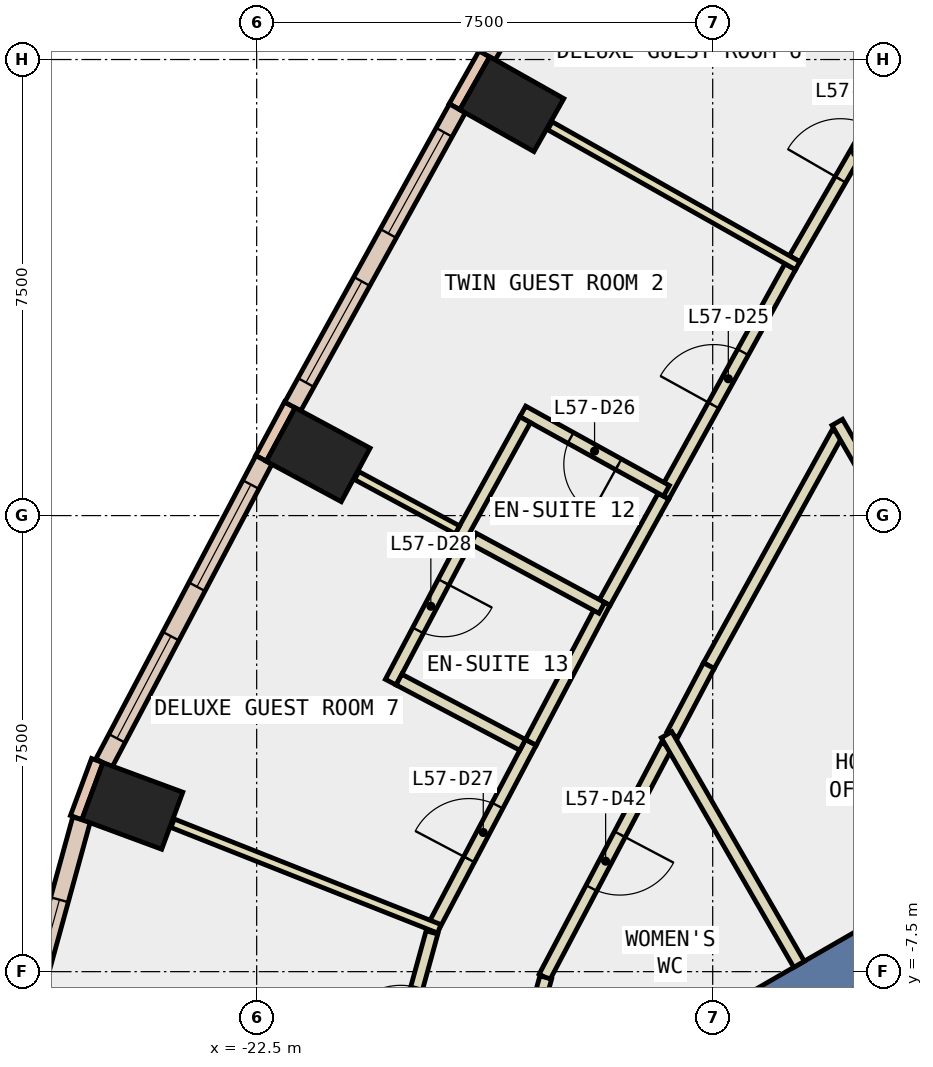
"""IFC4 building model, lengths in metres.
Left out: names, types, materials, properties, quantities, classifications, styles, units other than length and angle.
Written with IfcOpenShell. Run it as: python <this file> out.ifc"""

import sys

from ifc_helpers import new_model, si_unit, direction, frame, frame_2d, origin, origin_2d, place, context, subcontext, project, spatial, rectangle, extrude, element, fill, save


model = new_model("IFC4")
c1 = context("Model", 3, precision=1e-05, world=origin(), true_north=direction((0.0, 1.0)))
c2 = subcontext(c1, "Body", "Model", "MODEL_VIEW")
j1 = project(units=[si_unit("LENGTHUNIT", "METRE"), si_unit("PLANEANGLEUNIT", "RADIAN")], contexts=[c1])
p1 = place(None, origin())
s1 = spatial("IfcSite", under=j1, at=p1, CompositionType="ELEMENT")
p2 = place(p1, origin())
s2 = spatial("IfcBuilding", under=s1, at=p2, CompositionType="ELEMENT")
p3 = place(p2, frame((0.0, 0.0, 252.2)))
s3 = spatial("IfcBuildingStorey", under=s2, at=p3, CompositionType="ELEMENT", Elevation=252.2)
for number, where, z_axis, x_axis in (
    (1, (-18.304, 6.766, -0.34), (0.0, 0.0, 1.0), (0.491, 0.871, 0.0)),
    (2, (-21.488, 1.001, -0.34), (0.0, 0.0, 1.0), (0.474, 0.881, 0.0)),
    (3, (-24.545, -4.775, -0.34), (0.0, 0.0, 1.0), (0.347, 0.938, 0.0)),
):
    element("IfcColumn", number, at=place(p3, frame(where, z_axis=z_axis, x_axis=x_axis)), inside=s3, PredefinedType="COLUMN", context=c2, shape_type="SweptSolid", body=[
        extrude(rectangle(XDim=1.0, YDim=1.4, at=origin_2d()), origin(), (0.0, 0.0, 1.0), 3.6),
    ])
p4 = place(p3, frame((-7.578, -4.375, -0.34), z_axis=(0.0, 0.0, 1.0), x_axis=(-0.866024315419, -0.5000018851, 0.0)))
e4 = element("IfcWall", 4, at=p4, inside=s3, PredefinedType="SHEAR", context=c2, shape_type="SweptSolid", body=[
    extrude(rectangle(XDim=9.0, YDim=0.8, at=frame_2d((4.5, 0.0))), origin(), (0.0, 0.0, 1.0), 3.6),
])
for number, where, z_axis, x_axis in (
    (5, (-18.755, 7.594, 0.0), (0.0, 0.0, 1.0), (-0.492, -0.871, 0.0)),
    (6, (-21.955, 1.821, 0.0), (0.0, 0.0, 1.0), (-0.474, -0.881, 0.0)),
):
    element("IfcWall", number, at=place(p3, frame(where, z_axis=z_axis, x_axis=x_axis)), inside=s3, PredefinedType="STANDARD", context=c2, shape_type="SweptSolid", body=[
        extrude(rectangle(XDim=1.0, YDim=0.2, at=frame_2d((0.5, 0.0))), origin(), (0.0, 0.0, 1.0), 3.26),
    ])
p5 = place(p3, frame((-25.122, -4.029, 0.0), z_axis=(0.0, 0.0, 1.0), x_axis=(-0.346892928577, -0.937904737222, 0.0)))
e7 = element("IfcWall", 7, at=p5, inside=s3, PredefinedType="STANDARD", context=c2, shape_type="SweptSolid", body=[
    extrude(rectangle(XDim=1.0, YDim=0.2, at=frame_2d((0.5, 0.0))), origin(), (0.0, 0.0, 1.0), 3.26),
])
p6 = place(p3, frame((-15.906, 12.418, 0.0), z_axis=(0.0, 0.0, 1.0), x_axis=(-0.500089564757, -0.865973687372, 0.0)))
e8 = element("IfcWall", 8, at=p6, inside=s3, PredefinedType="STANDARD", context=c2, shape_type="SweptSolid", body=[
    extrude(rectangle(XDim=5.603, YDim=0.3, at=frame_2d((2.802, 0.0))), origin(), (0.0, 0.0, 1.0), 3.26),
])
p7 = place(p6, frame((0.451, 0.0, 0.9)))
e9 = element("IfcOpeningElement", 9, at=p7, cuts=e8, PredefinedType="OPENING", context=c2, shape_type="SweptSolid", body=[
    extrude(rectangle(XDim=1.9, YDim=2.0, at=frame_2d((0.95, 1.0))), frame((0.0, 0.16, 0.0), z_axis=(0.0, -1.0, 0.0), x_axis=(1.0, 0.0, 0.0)), (0.0, 0.0, 1.0), 0.32),
])
p8 = place(p6, frame((3.252, 0.0, 0.9)))
e10 = element("IfcOpeningElement", 10, at=p8, cuts=e8, PredefinedType="OPENING", context=c2, shape_type="SweptSolid", body=[
    extrude(rectangle(XDim=1.9, YDim=2.0, at=frame_2d((0.95, 1.0))), frame((0.0, 0.16, 0.0), z_axis=(0.0, -1.0, 0.0), x_axis=(1.0, 0.0, 0.0)), (0.0, 0.0, 1.0), 0.32),
])
p9 = place(p3, frame((-19.199, 6.697, 0.0), z_axis=(0.0, 0.0, 1.0), x_axis=(-0.483469062695, -0.875361448441, 0.0)))
e11 = element("IfcWall", 11, at=p9, inside=s3, PredefinedType="STANDARD", context=c2, shape_type="SweptSolid", body=[
    extrude(rectangle(XDim=5.601, YDim=0.3, at=frame_2d((2.801, 0.0))), origin(), (0.0, 0.0, 1.0), 3.26),
])
p10 = place(p9, frame((0.45, 0.0, 0.9)))
e12 = element("IfcOpeningElement", 12, at=p10, cuts=e11, PredefinedType="OPENING", context=c2, shape_type="SweptSolid", body=[
    extrude(rectangle(XDim=1.9, YDim=2.0, at=frame_2d((0.95, 1.0))), frame((0.0, 0.16, 0.0), z_axis=(0.0, -1.0, 0.0), x_axis=(1.0, 0.0, 0.0)), (0.0, 0.0, 1.0), 0.32),
])
p11 = place(p9, frame((3.251, 0.0, 0.9)))
e13 = element("IfcOpeningElement", 13, at=p11, cuts=e11, PredefinedType="OPENING", context=c2, shape_type="SweptSolid", body=[
    extrude(rectangle(XDim=1.9, YDim=2.0, at=frame_2d((0.95, 1.0))), frame((0.0, 0.16, 0.0), z_axis=(0.0, -1.0, 0.0), x_axis=(1.0, 0.0, 0.0)), (0.0, 0.0, 1.0), 0.32),
])
p12 = place(p3, frame((-22.381, 0.916, 0.0), z_axis=(0.0, 0.0, 1.0), x_axis=(-0.466663589714, -0.884434900959, 0.0)))
e14 = element("IfcWall", 14, at=p12, inside=s3, PredefinedType="STANDARD", context=c2, shape_type="SweptSolid", body=[
    extrude(rectangle(XDim=5.638, YDim=0.3, at=frame_2d((2.819, 0.0))), origin(), (0.0, 0.0, 1.0), 3.26),
])
p13 = place(p12, frame((0.459, 0.0, 0.9)))
e15 = element("IfcOpeningElement", 15, at=p13, cuts=e14, PredefinedType="OPENING", context=c2, shape_type="SweptSolid", body=[
    extrude(rectangle(XDim=1.9, YDim=2.0, at=frame_2d((0.95, 1.0))), frame((0.0, 0.16, 0.0), z_axis=(0.0, -1.0, 0.0), x_axis=(1.0, 0.0, 0.0)), (0.0, 0.0, 1.0), 0.32),
])
p14 = place(p12, frame((3.278, 0.0, 0.9)))
e16 = element("IfcOpeningElement", 16, at=p14, cuts=e14, PredefinedType="OPENING", context=c2, shape_type="SweptSolid", body=[
    extrude(rectangle(XDim=1.9, YDim=2.0, at=frame_2d((0.95, 1.0))), frame((0.0, 0.16, 0.0), z_axis=(0.0, -1.0, 0.0), x_axis=(1.0, 0.0, 0.0)), (0.0, 0.0, 1.0), 0.32),
])
p15 = place(p3, frame((-25.381, -4.998, 0.0), z_axis=(0.0, 0.0, 1.0), x_axis=(-0.264924661919, -0.964269113633, 0.0)))
e17 = element("IfcWall", 17, at=p15, inside=s3, PredefinedType="STANDARD", context=c2, shape_type="SweptSolid", body=[
    extrude(rectangle(XDim=4.137, YDim=0.3, at=frame_2d((2.068, 0.0))), origin(), (0.0, 0.0, 1.0), 3.26),
])
p16 = place(p15, frame((1.368, 0.0, 0.9)))
e18 = element("IfcOpeningElement", 18, at=p16, cuts=e17, PredefinedType="OPENING", context=c2, shape_type="SweptSolid", body=[
    extrude(rectangle(XDim=1.4, YDim=2.0, at=frame_2d((0.7, 1.0))), frame((0.0, 0.16, 0.0), z_axis=(0.0, -1.0, 0.0), x_axis=(1.0, 0.0, 0.0)), (0.0, 0.0, 1.0), 0.32),
])
p17 = place(p3, frame((-12.95, 1.36, 0.0), z_axis=(0.0, 0.0, 1.0), x_axis=(-0.483418231124, -0.875389521194, 0.0)))
e19 = element("IfcWall", 19, at=p17, inside=s3, PredefinedType="PARTITIONING", context=c2, shape_type="SweptSolid", body=[
    extrude(rectangle(XDim=4.373, YDim=0.2, at=frame_2d((2.187, 0.0))), origin(), (0.0, 0.0, 1.0), 3.26),
])
p18 = place(p3, frame((-15.064, -2.468, 0.0), z_axis=(0.0, 0.0, 1.0), x_axis=(-0.467126648849, -0.884190417238, 0.0)))
e20 = element("IfcWall", 20, at=p18, inside=s3, PredefinedType="PARTITIONING", context=c2, shape_type="SweptSolid", body=[
    extrude(rectangle(XDim=1.282, YDim=0.2, at=frame_2d((0.641, 0.0))), origin(), (0.0, 0.0, 1.0), 3.26),
])
p19 = place(p3, frame((-15.756, -3.779, 0.0), z_axis=(0.0, 0.0, 1.0), x_axis=(-0.46672043873, -0.884404902786, 0.0)))
e21 = element("IfcWall", 21, at=p19, inside=s3, PredefinedType="PARTITIONING", context=c2, shape_type="SweptSolid", body=[
    extrude(rectangle(XDim=4.307, YDim=0.2, at=frame_2d((2.153, 0.0))), origin(), (0.0, 0.0, 1.0), 3.26),
])
p20 = place(p19, frame((1.653, 0.0, 0.0)))
e22 = element("IfcOpeningElement", 22, at=p20, cuts=e21, PredefinedType="OPENING", context=c2, shape_type="SweptSolid", body=[
    extrude(rectangle(XDim=1.0, YDim=2.1, at=frame_2d((0.5, 1.05))), frame((0.0, 0.11, 0.0), z_axis=(0.0, -1.0, 0.0), x_axis=(1.0, 0.0, 0.0)), (0.0, 0.0, 1.0), 0.22),
])
p21 = place(p3, frame((-17.746, -7.596, 0.0), z_axis=(0.0, 0.0, 1.0), x_axis=(-0.264859637197, -0.96428697626, 0.0)))
e23 = element("IfcWall", 23, at=p21, inside=s3, PredefinedType="PARTITIONING", context=c2, shape_type="SweptSolid", body=[
    extrude(rectangle(XDim=2.122, YDim=0.2, at=frame_2d((1.061, 0.0))), origin(), (0.0, 0.0, 1.0), 3.26),
])
p22 = place(p3, frame((-13.652, 4.224, 0.0), z_axis=(0.0, 0.0, 1.0), x_axis=(0.500221427001, 0.865897525097, 0.0)))
e24 = element("IfcWall", 24, at=p22, inside=s3, PredefinedType="PARTITIONING", context=c2, shape_type="SweptSolid", body=[
    extrude(rectangle(XDim=3.91, YDim=0.2, at=frame_2d((1.955, 0.0))), origin(), (0.0, 0.0, 1.0), 3.26),
])
p23 = place(p22, frame((1.505, 0.0, 0.0)))
e25 = element("IfcOpeningElement", 25, at=p23, cuts=e24, PredefinedType="OPENING", context=c2, shape_type="SweptSolid", body=[
    extrude(rectangle(XDim=1.0, YDim=2.1, at=frame_2d((0.5, 1.05))), frame((0.0, 0.11, 0.0), z_axis=(0.0, -1.0, 0.0), x_axis=(1.0, 0.0, 0.0)), (0.0, 0.0, 1.0), 0.22),
])
p24 = place(p3, frame((-15.809, 0.32, 0.0), z_axis=(0.0, 0.0, 1.0), x_axis=(0.483322920175, 0.875442148193, 0.0)))
e26 = element("IfcWall", 26, at=p24, inside=s3, PredefinedType="PARTITIONING", context=c2, shape_type="SweptSolid", body=[
    extrude(rectangle(XDim=4.31, YDim=0.2, at=frame_2d((2.155, 0.0))), origin(), (0.0, 0.0, 1.0), 3.26),
])
p25 = place(p24, frame((1.705, 0.0, 0.0)))
e27 = element("IfcOpeningElement", 27, at=p25, cuts=e26, PredefinedType="OPENING", context=c2, shape_type="SweptSolid", body=[
    extrude(rectangle(XDim=1.0, YDim=2.1, at=frame_2d((0.5, 1.05))), frame((0.0, 0.11, 0.0), z_axis=(0.0, -1.0, 0.0), x_axis=(1.0, 0.0, 0.0)), (0.0, 0.0, 1.0), 0.22),
])
p26 = place(p3, frame((-16.776, -1.43, 0.0), z_axis=(0.0, 0.0, 1.0), x_axis=(0.48360724937, 0.87528511261, 0.0)))
e28 = element("IfcWall", 28, at=p26, inside=s3, PredefinedType="PARTITIONING", context=c2, shape_type="SweptSolid", body=[
    extrude(rectangle(XDim=1.997, YDim=0.2, at=frame_2d((0.999, 0.0))), origin(), (0.0, 0.0, 1.0), 3.26),
])
p27 = place(p3, frame((-19.602, -6.781, 0.0), z_axis=(0.0, 0.0, 1.0), x_axis=(0.466827780692, 0.884348247679, 0.0)))
e29 = element("IfcWall", 29, at=p27, inside=s3, PredefinedType="PARTITIONING", context=c2, shape_type="SweptSolid", body=[
    extrude(rectangle(XDim=3.451, YDim=0.2, at=frame_2d((1.726, 0.0))), origin(), (0.0, 0.0, 1.0), 3.26),
])
p28 = place(p27, frame((1.275, 0.0, 0.0)))
e30 = element("IfcOpeningElement", 30, at=p28, cuts=e29, PredefinedType="OPENING", context=c2, shape_type="SweptSolid", body=[
    extrude(rectangle(XDim=1.0, YDim=2.1, at=frame_2d((0.5, 1.05))), frame((0.0, 0.11, 0.0), z_axis=(0.0, -1.0, 0.0), x_axis=(1.0, 0.0, 0.0)), (0.0, 0.0, 1.0), 0.22),
])
p29 = place(p3, frame((-17.991, -3.729, 0.0), z_axis=(0.0, 0.0, 1.0), x_axis=(0.466450569784, 0.88454726609, 0.0)))
e31 = element("IfcWall", 31, at=p29, inside=s3, PredefinedType="PARTITIONING", context=c2, shape_type="SweptSolid", body=[
    extrude(rectangle(XDim=2.6, YDim=0.2, at=frame_2d((1.3, 0.0))), origin(), (0.0, 0.0, 1.0), 3.26),
])
p30 = place(p3, frame((-20.379, -9.629, 0.0), z_axis=(0.0, 0.0, 1.0), x_axis=(0.26487636938, 0.964282380293, 0.0)))
e32 = element("IfcWall", 32, at=p30, inside=s3, PredefinedType="PARTITIONING", context=c2, shape_type="SweptSolid", body=[
    extrude(rectangle(XDim=2.877, YDim=0.2, at=frame_2d((1.438, 0.0))), origin(), (0.0, 0.0, 1.0), 3.26),
])
p31 = place(p30, frame((0.938, 0.0, 0.0)))
e33 = element("IfcOpeningElement", 33, at=p31, cuts=e32, PredefinedType="OPENING", context=c2, shape_type="SweptSolid", body=[
    extrude(rectangle(XDim=1.0, YDim=2.1, at=frame_2d((0.5, 1.05))), frame((0.0, 0.11, 0.0), z_axis=(0.0, -1.0, 0.0), x_axis=(1.0, 0.0, 0.0)), (0.0, 0.0, 1.0), 0.22),
])
p32 = place(p3, frame((-8.582, -6.036, 0.0), z_axis=(0.0, 0.0, 1.0), x_axis=(-0.897105141673, -0.441817116897, 0.0)))
e34 = element("IfcWall", 34, at=p32, inside=s3, PredefinedType="PARTITIONING", context=c2, shape_type="SweptSolid", body=[
    extrude(rectangle(XDim=5.111, YDim=0.2, at=frame_2d((2.555, 0.0))), origin(), (0.0, 0.0, 1.0), 3.26),
])
p33 = place(p3, frame((-13.58, -7.379, 0.0), z_axis=(0.0, 0.0, 1.0), x_axis=(-0.499916403993, 0.866073662582, 0.0)))
e35 = element("IfcWall", 35, at=p33, inside=s3, PredefinedType="PARTITIONING", context=c2, shape_type="SweptSolid", body=[
    extrude(rectangle(XDim=4.359, YDim=0.2, at=frame_2d((2.179, 0.0))), origin(), (0.0, 0.0, 1.0), 3.26),
])
p34 = place(p3, frame((-13.825, 8.723, 0.0), z_axis=(0.0, 0.0, 1.0), x_axis=(0.866053019151, -0.499952165731, 0.0)))
e36 = element("IfcWall", 36, at=p34, inside=s3, PredefinedType="PARTITIONING", context=c2, shape_type="SweptSolid", body=[
    extrude(rectangle(XDim=2.3, YDim=0.2, at=frame_2d((1.15, 0.0))), origin(), (0.0, 0.0, 1.0), 3.26),
])
p35 = place(p3, frame((-13.602, 4.11, 0.0), z_axis=(0.0, 0.0, 1.0), x_axis=(-0.870787203306, 0.491660092502, 0.0)))
e37 = element("IfcWall", 37, at=p35, inside=s3, PredefinedType="PARTITIONING", context=c2, shape_type="SweptSolid", body=[
    extrude(rectangle(XDim=4.68, YDim=0.15, at=frame_2d((2.34, 0.0))), origin(), (0.0, 0.0, 1.0), 3.26),
])
p36 = place(p3, frame((-15.761, 0.408, 0.0), z_axis=(0.0, 0.0, 1.0), x_axis=(-0.875391622802, 0.483414425445, 0.0)))
e38 = element("IfcWall", 38, at=p36, inside=s3, PredefinedType="PARTITIONING", context=c2, shape_type="SweptSolid", body=[
    extrude(rectangle(XDim=2.699, YDim=0.2, at=frame_2d((1.35, 0.0))), origin(), (0.0, 0.0, 1.0), 3.26),
])
p37 = place(p36, frame((0.9, 0.0, 0.0)))
e39 = element("IfcOpeningElement", 39, at=p37, cuts=e38, PredefinedType="OPENING", context=c2, shape_type="SweptSolid", body=[
    extrude(rectangle(XDim=0.9, YDim=2.1, at=frame_2d((0.45, 1.05))), frame((0.0, 0.11, 0.0), z_axis=(0.0, -1.0, 0.0), x_axis=(1.0, 0.0, 0.0)), (0.0, 0.0, 1.0), 0.22),
])
p38 = place(p3, frame((-18.085, 1.577, 0.0), z_axis=(0.0, 0.0, 1.0), x_axis=(-0.483329790342, -0.875438355207, 0.0)))
e40 = element("IfcWall", 40, at=p38, inside=s3, PredefinedType="PARTITIONING", context=c2, shape_type="SweptSolid", body=[
    extrude(rectangle(XDim=2.224, YDim=0.2, at=frame_2d((1.112, 0.0))), origin(), (0.0, 0.0, 1.0), 3.26),
])
p39 = place(p3, frame((-19.199, -0.235, 0.0), z_axis=(0.0, 0.0, 1.0), x_axis=(-0.880166754904, 0.474664601126, 0.0)))
e41 = element("IfcWall", 41, at=p39, inside=s3, PredefinedType="PARTITIONING", context=c2, shape_type="SweptSolid", body=[
    extrude(rectangle(XDim=1.881, YDim=0.15, at=frame_2d((0.941, 0.0))), origin(), (0.0, 0.0, 1.0), 3.26),
])
p40 = place(p3, frame((-16.824, -1.518, 0.0), z_axis=(0.0, 0.0, 1.0), x_axis=(-0.879879019938, 0.47519775912, 0.0)))
e42 = element("IfcWall", 42, at=p40, inside=s3, PredefinedType="PARTITIONING", context=c2, shape_type="SweptSolid", body=[
    extrude(rectangle(XDim=2.399, YDim=0.2, at=frame_2d((1.2, 0.0))), origin(), (0.0, 0.0, 1.0), 3.26),
])
p41 = place(p3, frame((-19.069, -0.418, 0.0), z_axis=(0.0, 0.0, 1.0), x_axis=(-0.467007153784, -0.884253537349, 0.0)))
e43 = element("IfcWall", 43, at=p41, inside=s3, PredefinedType="PARTITIONING", context=c2, shape_type="SweptSolid", body=[
    extrude(rectangle(XDim=2.625, YDim=0.2, at=frame_2d((1.312, 0.0))), origin(), (0.0, 0.0, 1.0), 3.26),
])
p42 = place(p41, frame((0.763, 0.0, 0.0)))
e44 = element("IfcOpeningElement", 44, at=p42, cuts=e43, PredefinedType="OPENING", context=c2, shape_type="SweptSolid", body=[
    extrude(rectangle(XDim=0.9, YDim=2.1, at=frame_2d((0.45, 1.05))), frame((0.0, 0.11, 0.0), z_axis=(0.0, -1.0, 0.0), x_axis=(1.0, 0.0, 0.0)), (0.0, 0.0, 1.0), 0.22),
])
p43 = place(p3, frame((-20.16, -2.697, 0.0), z_axis=(0.0, 0.0, 1.0), x_axis=(0.884293452572, -0.466931568583, 0.0)))
e45 = element("IfcWall", 45, at=p43, inside=s3, PredefinedType="PARTITIONING", context=c2, shape_type="SweptSolid", body=[
    extrude(rectangle(XDim=2.3, YDim=0.2, at=frame_2d((1.15, 0.0))), origin(), (0.0, 0.0, 1.0), 3.26),
])
p44 = place(p3, frame((-19.497, -6.795, 0.0), z_axis=(0.0, 0.0, 1.0), x_axis=(-0.929826906887, 0.367997178289, 0.0)))
e46 = element("IfcWall", 46, at=p44, inside=s3, PredefinedType="PARTITIONING", context=c2, shape_type="SweptSolid", body=[
    extrude(rectangle(XDim=4.717, YDim=0.15, at=frame_2d((2.358, 0.0))), origin(), (0.0, 0.0, 1.0), 3.26),
])
p45 = place(p3, frame((-9.25, -4.879, 0.0), z_axis=(0.0, 0.0, 1.0), x_axis=(-0.499944124422, 0.866057661161, 0.0)))
e47 = element("IfcWall", 47, at=p45, inside=s3, PredefinedType="PARTITIONING", context=c2, shape_type="SweptSolid", body=[
    extrude(rectangle(XDim=7.405, YDim=0.2, at=frame_2d((3.702, 0.0))), origin(), (0.0, 0.0, 1.0), 3.26),
])
p46 = place(p45, frame((2.533, 0.0, 0.0)))
e48 = element("IfcOpeningElement", 48, at=p46, cuts=e47, PredefinedType="OPENING", context=c2, shape_type="SweptSolid", body=[
    extrude(rectangle(XDim=0.9, YDim=2.1, at=frame_2d((0.45, 1.05))), frame((0.0, 0.11, 0.0), z_axis=(0.0, -1.0, 0.0), x_axis=(1.0, 0.0, 0.0)), (0.0, 0.0, 1.0), 0.22),
])
p47 = place(p10, origin())
e49 = element("IfcWindow", 49, at=p47, inside=s3, PartitioningType="SINGLE_PANEL", PredefinedType="WINDOW", context=c2, shape_type="SweptSolid", body=[
    extrude(rectangle(XDim=1.9, YDim=2.0, at=frame_2d((0.95, 1.0))), frame((0.0, 0.03, 0.0), z_axis=(0.0, -1.0, 0.0), x_axis=(1.0, 0.0, 0.0)), (0.0, 0.0, 1.0), 0.06),
])
fill(e12, e49)
p48 = place(p11, origin())
e50 = element("IfcWindow", 50, at=p48, inside=s3, PartitioningType="SINGLE_PANEL", PredefinedType="WINDOW", context=c2, shape_type="SweptSolid", body=[
    extrude(rectangle(XDim=1.9, YDim=2.0, at=frame_2d((0.95, 1.0))), frame((0.0, 0.03, 0.0), z_axis=(0.0, -1.0, 0.0), x_axis=(1.0, 0.0, 0.0)), (0.0, 0.0, 1.0), 0.06),
])
fill(e13, e50)
p49 = place(p13, origin())
e51 = element("IfcWindow", 51, at=p49, inside=s3, PartitioningType="SINGLE_PANEL", PredefinedType="WINDOW", context=c2, shape_type="SweptSolid", body=[
    extrude(rectangle(XDim=1.9, YDim=2.0, at=frame_2d((0.95, 1.0))), frame((0.0, 0.03, 0.0), z_axis=(0.0, -1.0, 0.0), x_axis=(1.0, 0.0, 0.0)), (0.0, 0.0, 1.0), 0.06),
])
fill(e15, e51)
p50 = place(p14, origin())
e52 = element("IfcWindow", 52, at=p50, inside=s3, PartitioningType="SINGLE_PANEL", PredefinedType="WINDOW", context=c2, shape_type="SweptSolid", body=[
    extrude(rectangle(XDim=1.9, YDim=2.0, at=frame_2d((0.95, 1.0))), frame((0.0, 0.03, 0.0), z_axis=(0.0, -1.0, 0.0), x_axis=(1.0, 0.0, 0.0)), (0.0, 0.0, 1.0), 0.06),
])
fill(e16, e52)
p51 = place(p16, origin())
e53 = element("IfcWindow", 53, at=p51, inside=s3, PartitioningType="SINGLE_PANEL", PredefinedType="WINDOW", context=c2, shape_type="SweptSolid", body=[
    extrude(rectangle(XDim=1.4, YDim=2.0, at=frame_2d((0.7, 1.0))), frame((0.0, 0.03, 0.0), z_axis=(0.0, -1.0, 0.0), x_axis=(1.0, 0.0, 0.0)), (0.0, 0.0, 1.0), 0.06),
])
fill(e18, e53)
p52 = place(p23, origin())
e54 = element("IfcDoor", 54, at=p52, inside=s3, OperationType="SINGLE_SWING_RIGHT", PredefinedType="DOOR", context=c2, shape_type="SweptSolid", body=[
    extrude(rectangle(XDim=1.0, YDim=2.1, at=frame_2d((0.5, 1.05))), frame((0.0, 0.025, 0.0), z_axis=(0.0, -1.0, 0.0), x_axis=(1.0, 0.0, 0.0)), (0.0, 0.0, 1.0), 0.05),
])
fill(e25, e54)
p53 = place(p25, origin())
e55 = element("IfcDoor", 55, at=p53, inside=s3, OperationType="SINGLE_SWING_RIGHT", PredefinedType="DOOR", context=c2, shape_type="SweptSolid", body=[
    extrude(rectangle(XDim=1.0, YDim=2.1, at=frame_2d((0.5, 1.05))), frame((0.0, 0.025, 0.0), z_axis=(0.0, -1.0, 0.0), x_axis=(1.0, 0.0, 0.0)), (0.0, 0.0, 1.0), 0.05),
])
fill(e27, e55)
p54 = place(p37, origin())
e56 = element("IfcDoor", 56, at=p54, inside=s3, OperationType="SINGLE_SWING_LEFT", PredefinedType="DOOR", context=c2, shape_type="SweptSolid", body=[
    extrude(rectangle(XDim=0.9, YDim=2.1, at=frame_2d((0.45, 1.05))), frame((0.0, 0.025, 0.0), z_axis=(0.0, -1.0, 0.0), x_axis=(1.0, 0.0, 0.0)), (0.0, 0.0, 1.0), 0.05),
])
fill(e39, e56)
p55 = place(p28, origin())
e57 = element("IfcDoor", 57, at=p55, inside=s3, OperationType="SINGLE_SWING_LEFT", PredefinedType="DOOR", context=c2, shape_type="SweptSolid", body=[
    extrude(rectangle(XDim=1.0, YDim=2.1, at=frame_2d((0.5, 1.05))), frame((0.0, 0.025, 0.0), z_axis=(0.0, -1.0, 0.0), x_axis=(1.0, 0.0, 0.0)), (0.0, 0.0, 1.0), 0.05),
])
fill(e30, e57)
p56 = place(p42, origin())
e58 = element("IfcDoor", 58, at=p56, inside=s3, OperationType="SINGLE_SWING_LEFT", PredefinedType="DOOR", context=c2, shape_type="SweptSolid", body=[
    extrude(rectangle(XDim=0.9, YDim=2.1, at=frame_2d((0.45, 1.05))), frame((0.0, 0.025, 0.0), z_axis=(0.0, -1.0, 0.0), x_axis=(1.0, 0.0, 0.0)), (0.0, 0.0, 1.0), 0.05),
])
fill(e44, e58)
p57 = place(p31, origin())
e59 = element("IfcDoor", 59, at=p57, inside=s3, OperationType="SINGLE_SWING_LEFT", PredefinedType="DOOR", context=c2, shape_type="SweptSolid", body=[
    extrude(rectangle(XDim=1.0, YDim=2.1, at=frame_2d((0.5, 1.05))), frame((0.0, 0.025, 0.0), z_axis=(0.0, -1.0, 0.0), x_axis=(1.0, 0.0, 0.0)), (0.0, 0.0, 1.0), 0.05),
])
fill(e33, e59)
p58 = place(p20, origin())
e60 = element("IfcDoor", 60, at=p58, inside=s3, OperationType="SINGLE_SWING_LEFT", PredefinedType="DOOR", context=c2, shape_type="SweptSolid", body=[
    extrude(rectangle(XDim=1.0, YDim=2.1, at=frame_2d((0.5, 1.05))), frame((0.0, 0.025, 0.0), z_axis=(0.0, -1.0, 0.0), x_axis=(1.0, 0.0, 0.0)), (0.0, 0.0, 1.0), 0.05),
])
fill(e22, e60)
save(model, sys.argv[1])
